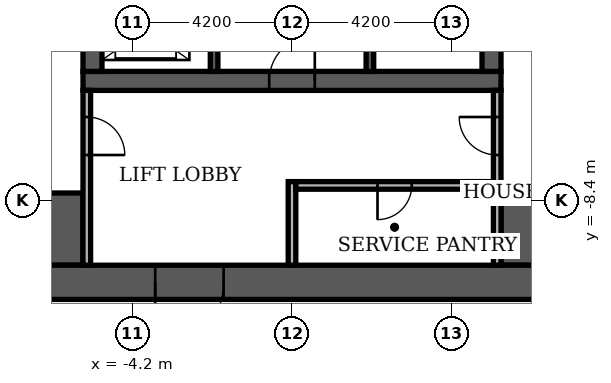
"""IFC4 building model, lengths in metres.
Left out: names, types, materials, properties, quantities, classifications, styles, units other than length and angle.
Written with IfcOpenShell. Run it as: python <this file> out.ifc"""

import sys

from ifc_helpers import new_model, si_unit, direction, frame, frame_2d, origin, place, context, subcontext, project, spatial, rectangle, extrude, element, fill, save


model = new_model("IFC4")
c1 = context("Model", 3, precision=1e-05, world=origin(), true_north=direction((0.0, 1.0)))
c2 = subcontext(c1, "Body", "Model", "MODEL_VIEW")
j1 = project(units=[si_unit("LENGTHUNIT", "METRE"), si_unit("PLANEANGLEUNIT", "RADIAN")], contexts=[c1])
p1 = place(None, origin())
s1 = spatial("IfcSite", under=j1, at=p1, CompositionType="ELEMENT")
p2 = place(p1, origin())
s2 = spatial("IfcBuilding", under=s1, at=p2, CompositionType="ELEMENT")
p3 = place(p2, frame((0.0, 0.0, -8.4)))
s3 = spatial("IfcBuildingStorey", under=s2, at=p3, CompositionType="ELEMENT", Elevation=-8.4)
p4 = place(p3, frame((-5.5, -5.25, 0.0), z_axis=(0.0, 0.0, 1.0), x_axis=(1.0, 0.0, 0.0)))
e1 = element("IfcWall", 1, at=p4, inside=s3, PredefinedType="SHEAR", context=c2, shape_type="SweptSolid", body=[
    extrude(rectangle(XDim=11.0, YDim=0.5, at=frame_2d((5.5, 0.0))), origin(), (0.0, 0.0, 1.0), 3.85),
])
p5 = place(p4, frame((4.9, 0.0, 0.0)))
e2 = element("IfcOpeningElement", 2, at=p5, cuts=e1, PredefinedType="OPENING", context=c2, shape_type="SweptSolid", body=[
    extrude(rectangle(XDim=1.2, YDim=2.1, at=frame_2d((0.6, 1.05))), frame((0.0, 0.26, 0.0), z_axis=(0.0, -1.0, 0.0), x_axis=(1.0, 0.0, 0.0)), (0.0, 0.0, 1.0), 0.52),
])
for number, where, z_axis, x_axis in (
    (3, (-5.25, -5.0, 0.0), (0.0, 0.0, 1.0), (0.0, 1.0, 0.0)),
    (4, (5.25, -5.0, 0.0), (0.0, 0.0, 1.0), (0.0, 1.0, 0.0)),
):
    element("IfcWall", number, at=place(p3, frame(where, z_axis=z_axis, x_axis=x_axis)), inside=s3, PredefinedType="SHEAR", context=c2, shape_type="SweptSolid", body=[
        extrude(rectangle(XDim=10.5, YDim=0.5, at=frame_2d((5.25, 0.0))), origin(), (0.0, 0.0, 1.0), 3.85),
    ])
for number, where, z_axis, x_axis in (
    (5, (-10.1, -9.15, 0.0), (0.0, 0.0, 1.0), (1.0, 0.0, 0.0)),
    (6, (5.5, -9.15, 0.0), (0.0, 0.0, 1.0), (1.0, 0.0, 0.0)),
):
    element("IfcWall", number, at=place(p3, frame(where, z_axis=z_axis, x_axis=x_axis)), inside=s3, PredefinedType="SHEAR", context=c2, shape_type="SweptSolid", body=[
        extrude(rectangle(XDim=4.6, YDim=1.9, at=frame_2d((2.3, 0.0))), origin(), (0.0, 0.0, 1.0), 3.85),
    ])
p6 = place(p3, frame((2.05, -5.0, 0.0), z_axis=(0.0, 0.0, 1.0), x_axis=(0.0, 1.0, 0.0)))
e7 = element("IfcWall", 7, at=p6, inside=s3, PredefinedType="SHEAR", context=c2, shape_type="SweptSolid", body=[
    extrude(rectangle(XDim=6.6, YDim=0.2, at=frame_2d((3.3, 0.0))), origin(), (0.0, 0.0, 1.0), 3.85),
])
p7 = place(p6, frame((5.25, 0.0, 0.0)))
e8 = element("IfcOpeningElement", 8, at=p7, cuts=e7, PredefinedType="OPENING", context=c2, shape_type="SweptSolid", body=[
    extrude(rectangle(XDim=1.0, YDim=2.1, at=frame_2d((0.5, 1.05))), frame((0.0, 0.11, 0.0), z_axis=(0.0, -1.0, 0.0), x_axis=(1.0, 0.0, 0.0)), (0.0, 0.0, 1.0), 0.22),
])
p8 = place(p3, frame((-2.05, -5.0, 0.0), z_axis=(0.0, 0.0, 1.0), x_axis=(0.0, 1.0, 0.0)))
e9 = element("IfcWall", 9, at=p8, inside=s3, PredefinedType="SHEAR", context=c2, shape_type="SweptSolid", body=[
    extrude(rectangle(XDim=3.4, YDim=0.2, at=frame_2d((1.7, 0.0))), origin(), (0.0, 0.0, 1.0), 3.85),
])
p9 = place(p8, frame((0.55, 0.0, 0.0)))
e10 = element("IfcOpeningElement", 10, at=p9, cuts=e9, PredefinedType="OPENING", context=c2, shape_type="SweptSolid", body=[
    extrude(rectangle(XDim=1.1, YDim=2.1, at=frame_2d((0.55, 1.05))), frame((0.0, 0.11, 0.0), z_axis=(0.0, -1.0, 0.0), x_axis=(1.0, 0.0, 0.0)), (0.0, 0.0, 1.0), 0.22),
])
p10 = place(p8, frame((2.45, 0.0, 0.0)))
e11 = element("IfcOpeningElement", 11, at=p10, cuts=e9, PredefinedType="OPENING", context=c2, shape_type="SweptSolid", body=[
    extrude(rectangle(XDim=0.8, YDim=2.1, at=frame_2d((0.4, 1.05))), frame((0.0, 0.11, 0.0), z_axis=(0.0, -1.0, 0.0), x_axis=(1.0, 0.0, 0.0)), (0.0, 0.0, 1.0), 0.22),
])
p11 = place(p3, frame((-11.0, -10.55, 0.0), z_axis=(0.0, 0.0, 1.0), x_axis=(1.0, 0.0, 0.0)))
e12 = element("IfcWall", 12, at=p11, inside=s3, PredefinedType="SHEAR", context=c2, shape_type="SweptSolid", body=[
    extrude(rectangle(XDim=22.0, YDim=0.9, at=frame_2d((11.0, 0.0))), origin(), (0.0, 0.0, 1.0), 3.85),
])
p12 = place(p11, frame((7.4, 0.0, 0.0)))
e13 = element("IfcOpeningElement", 13, at=p12, cuts=e12, PredefinedType="OPENING", context=c2, shape_type="SweptSolid", body=[
    extrude(rectangle(XDim=1.8, YDim=2.2, at=frame_2d((0.9, 1.1))), frame((0.0, 0.46, 0.0), z_axis=(0.0, -1.0, 0.0), x_axis=(1.0, 0.0, 0.0)), (0.0, 0.0, 1.0), 0.92),
])
p13 = place(p3, frame((-5.4, -10.1, 0.0), z_axis=(0.0, 0.0, 1.0), x_axis=(0.0, 1.0, 0.0)))
e14 = element("IfcWall", 14, at=p13, inside=s3, PredefinedType="PARTITIONING", context=c2, shape_type="SweptSolid", body=[
    extrude(rectangle(XDim=4.6, YDim=0.2, at=frame_2d((2.3, 0.0))), origin(), (0.0, 0.0, 1.0), 3.85),
])
p14 = place(p13, frame((2.9, 0.0, 0.0)))
e15 = element("IfcOpeningElement", 15, at=p14, cuts=e14, PredefinedType="OPENING", context=c2, shape_type="SweptSolid", body=[
    extrude(rectangle(XDim=1.0, YDim=2.1, at=frame_2d((0.5, 1.05))), frame((0.0, 0.11, 0.0), z_axis=(0.0, -1.0, 0.0), x_axis=(1.0, 0.0, 0.0)), (0.0, 0.0, 1.0), 0.22),
])
p15 = place(p3, frame((0.0, -10.1, 0.0), z_axis=(0.0, 0.0, 1.0), x_axis=(0.0, 1.0, 0.0)))
e16 = element("IfcWall", 16, at=p15, inside=s3, PredefinedType="PARTITIONING", context=c2, shape_type="SweptSolid", body=[
    extrude(rectangle(XDim=2.2, YDim=0.2, at=frame_2d((1.1, 0.0))), origin(), (0.0, 0.0, 1.0), 3.85),
])
p16 = place(p3, frame((5.4, -10.1, 0.0), z_axis=(0.0, 0.0, 1.0), x_axis=(0.0, 1.0, 0.0)))
e17 = element("IfcWall", 17, at=p16, inside=s3, PredefinedType="PARTITIONING", context=c2, shape_type="SweptSolid", body=[
    extrude(rectangle(XDim=4.6, YDim=0.2, at=frame_2d((2.3, 0.0))), origin(), (0.0, 0.0, 1.0), 3.85),
])
p17 = place(p16, frame((2.9, 0.0, 0.0)))
e18 = element("IfcOpeningElement", 18, at=p17, cuts=e17, PredefinedType="OPENING", context=c2, shape_type="SweptSolid", body=[
    extrude(rectangle(XDim=1.0, YDim=2.1, at=frame_2d((0.5, 1.05))), frame((0.0, 0.11, 0.0), z_axis=(0.0, -1.0, 0.0), x_axis=(1.0, 0.0, 0.0)), (0.0, 0.0, 1.0), 0.22),
])
p18 = place(p3, frame((0.1, -8.0, 0.0), z_axis=(0.0, 0.0, 1.0), x_axis=(1.0, 0.0, 0.0)))
e19 = element("IfcWall", 19, at=p18, inside=s3, PredefinedType="PARTITIONING", context=c2, shape_type="SweptSolid", body=[
    extrude(rectangle(XDim=5.2, YDim=0.2, at=frame_2d((2.6, 0.0))), origin(), (0.0, 0.0, 1.0), 3.85),
])
p19 = place(p18, frame((2.15, 0.0, 0.0)))
e20 = element("IfcOpeningElement", 20, at=p19, cuts=e19, PredefinedType="OPENING", context=c2, shape_type="SweptSolid", body=[
    extrude(rectangle(XDim=0.9, YDim=2.1, at=frame_2d((0.45, 1.05))), frame((0.0, 0.11, 0.0), z_axis=(0.0, -1.0, 0.0), x_axis=(1.0, 0.0, 0.0)), (0.0, 0.0, 1.0), 0.22),
])
p20 = place(p5, origin())
e21 = element("IfcDoor", 21, at=p20, inside=s3, OperationType="SINGLE_SWING_RIGHT", PredefinedType="DOOR", context=c2, shape_type="SweptSolid", body=[
    extrude(rectangle(XDim=1.2, YDim=2.1, at=frame_2d((0.6, 1.05))), frame((0.0, 0.025, 0.0), z_axis=(0.0, -1.0, 0.0), x_axis=(1.0, 0.0, 0.0)), (0.0, 0.0, 1.0), 0.05),
])
fill(e2, e21)
p21 = place(p14, frame((1.0, 0.0, 0.0), z_axis=(0.0, 0.0, 1.0), x_axis=(-1.0, 0.0, 0.0)))
e22 = element("IfcDoor", 22, at=p21, inside=s3, OperationType="SINGLE_SWING_LEFT", PredefinedType="DOOR", context=c2, shape_type="SweptSolid", body=[
    extrude(rectangle(XDim=1.0, YDim=2.1, at=frame_2d((0.5, 1.05))), frame((0.0, 0.025, 0.0), z_axis=(0.0, -1.0, 0.0), x_axis=(1.0, 0.0, 0.0)), (0.0, 0.0, 1.0), 0.05),
])
fill(e15, e22)
p22 = place(p17, origin())
e23 = element("IfcDoor", 23, at=p22, inside=s3, OperationType="SINGLE_SWING_RIGHT", PredefinedType="DOOR", context=c2, shape_type="SweptSolid", body=[
    extrude(rectangle(XDim=1.0, YDim=2.1, at=frame_2d((0.5, 1.05))), frame((0.0, 0.025, 0.0), z_axis=(0.0, -1.0, 0.0), x_axis=(1.0, 0.0, 0.0)), (0.0, 0.0, 1.0), 0.05),
])
fill(e18, e23)
p23 = place(p12, frame((1.8, 0.0, 0.0), z_axis=(0.0, 0.0, 1.0), x_axis=(-1.0, 0.0, 0.0)))
e24 = element("IfcDoor", 24, at=p23, inside=s3, OperationType="DOUBLE_DOOR_SINGLE_SWING", PredefinedType="DOOR", context=c2, shape_type="SweptSolid", body=[
    extrude(rectangle(XDim=1.8, YDim=2.2, at=frame_2d((0.9, 1.1))), frame((0.0, 0.025, 0.0), z_axis=(0.0, -1.0, 0.0), x_axis=(1.0, 0.0, 0.0)), (0.0, 0.0, 1.0), 0.05),
])
fill(e13, e24)
p24 = place(p19, frame((0.9, 0.0, 0.0), z_axis=(0.0, 0.0, 1.0), x_axis=(-1.0, 0.0, 0.0)))
e25 = element("IfcDoor", 25, at=p24, inside=s3, OperationType="SINGLE_SWING_LEFT", PredefinedType="DOOR", context=c2, shape_type="SweptSolid", body=[
    extrude(rectangle(XDim=0.9, YDim=2.1, at=frame_2d((0.45, 1.05))), frame((0.0, 0.025, 0.0), z_axis=(0.0, -1.0, 0.0), x_axis=(1.0, 0.0, 0.0)), (0.0, 0.0, 1.0), 0.05),
])
fill(e20, e25)
save(model, sys.argv[1])
